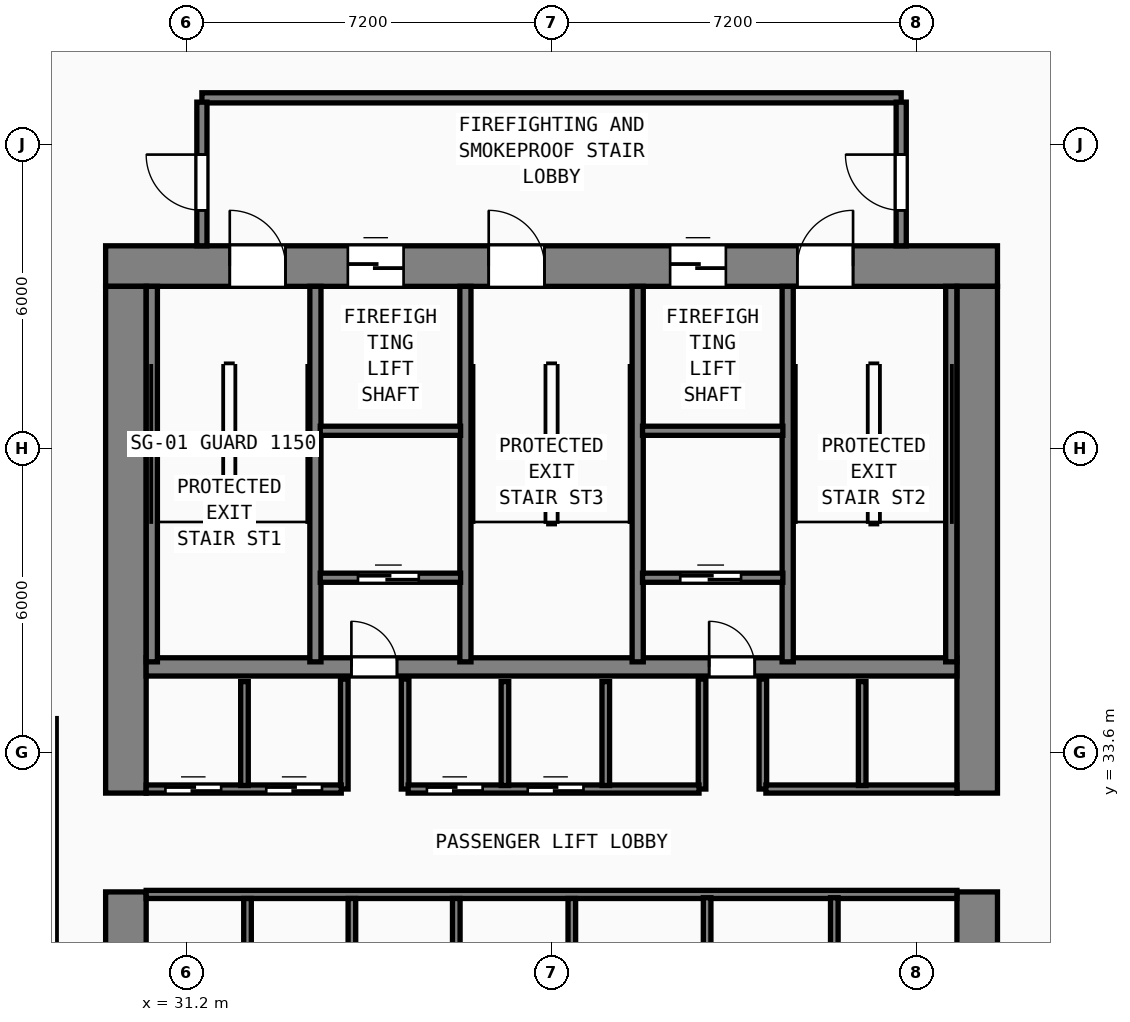
"""IFC4 building model, lengths in metres.
Left out: names, types, materials, properties, quantities, classifications, styles, units other than length and angle.
Written with IfcOpenShell. Run it as: python <this file> out.ifc"""

import sys

from ifc_helpers import new_model, si_unit, direction, frame, frame_2d, origin, place, context, subcontext, project, spatial, rectangle, extrude, element, fill, save


model = new_model("IFC4")
c1 = context("Model", 3, precision=1e-05, world=origin(), true_north=direction((0.0, 1.0)))
c2 = subcontext(c1, "Body", "Model", "MODEL_VIEW")
j1 = project(units=[si_unit("LENGTHUNIT", "METRE"), si_unit("PLANEANGLEUNIT", "RADIAN")], contexts=[c1])
p1 = place(None, origin())
s1 = spatial("IfcSite", under=j1, at=p1, CompositionType="ELEMENT")
p2 = place(p1, origin())
s2 = spatial("IfcBuilding", under=s1, at=p2, CompositionType="ELEMENT")
p3 = place(p2, frame((0.0, 0.0, 15.6)))
s3 = spatial("IfcBuildingStorey", under=s2, at=p3, CompositionType="ELEMENT", Elevation=15.6)
p4 = place(p3, frame((29.6, 43.2, 0.0), z_axis=(0.0, 0.0, 1.0), x_axis=(1.0, 0.0, 0.0)))
e1 = element("IfcWall", 1, at=p4, inside=s3, PredefinedType="SHEAR", context=c2, shape_type="SweptSolid", body=[
    extrude(rectangle(XDim=17.6, YDim=0.8, at=frame_2d((8.8, 0.0))), origin(), (0.0, 0.0, 1.0), 3.78),
])
p5 = place(p4, frame((2.45, 0.0, 0.0)))
e2 = element("IfcOpeningElement", 2, at=p5, cuts=e1, PredefinedType="OPENING", context=c2, shape_type="SweptSolid", body=[
    extrude(rectangle(XDim=1.1, YDim=2.15, at=frame_2d((0.55, 1.075))), frame((0.0, 0.41, 0.0), z_axis=(0.0, -1.0, 0.0), x_axis=(1.0, 0.0, 0.0)), (0.0, 0.0, 1.0), 0.82),
])
p6 = place(p4, frame((7.56, 0.0, 0.0)))
e3 = element("IfcOpeningElement", 3, at=p6, cuts=e1, PredefinedType="OPENING", context=c2, shape_type="SweptSolid", body=[
    extrude(rectangle(XDim=1.1, YDim=2.15, at=frame_2d((0.55, 1.075))), frame((0.0, 0.41, 0.0), z_axis=(0.0, -1.0, 0.0), x_axis=(1.0, 0.0, 0.0)), (0.0, 0.0, 1.0), 0.82),
])
p7 = place(p4, frame((13.65, 0.0, 0.0)))
e4 = element("IfcOpeningElement", 4, at=p7, cuts=e1, PredefinedType="OPENING", context=c2, shape_type="SweptSolid", body=[
    extrude(rectangle(XDim=1.1, YDim=2.15, at=frame_2d((0.55, 1.075))), frame((0.0, 0.41, 0.0), z_axis=(0.0, -1.0, 0.0), x_axis=(1.0, 0.0, 0.0)), (0.0, 0.0, 1.0), 0.82),
])
p8 = place(p4, frame((4.78, 0.0, 0.0)))
e5 = element("IfcOpeningElement", 5, at=p8, cuts=e1, PredefinedType="OPENING", context=c2, shape_type="SweptSolid", body=[
    extrude(rectangle(XDim=1.1, YDim=2.2, at=frame_2d((0.55, 1.1))), frame((0.0, 0.41, 0.0), z_axis=(0.0, -1.0, 0.0), x_axis=(1.0, 0.0, 0.0)), (0.0, 0.0, 1.0), 0.82),
])
p9 = place(p4, frame((11.14, 0.0, 0.0)))
e6 = element("IfcOpeningElement", 6, at=p9, cuts=e1, PredefinedType="OPENING", context=c2, shape_type="SweptSolid", body=[
    extrude(rectangle(XDim=1.1, YDim=2.2, at=frame_2d((0.55, 1.1))), frame((0.0, 0.41, 0.0), z_axis=(0.0, -1.0, 0.0), x_axis=(1.0, 0.0, 0.0)), (0.0, 0.0, 1.0), 0.82),
])
p10 = place(p3, frame((30.0, 26.8, 0.0), z_axis=(0.0, 0.0, 1.0), x_axis=(0.0, 1.0, 0.0)))
e7 = element("IfcWall", 7, at=p10, inside=s3, PredefinedType="SHEAR", context=c2, shape_type="SweptSolid", body=[
    extrude(rectangle(XDim=4.05, YDim=0.8, at=frame_2d((2.025, 0.0))), origin(), (0.0, 0.0, 1.0), 3.78),
])
p11 = place(p3, frame((30.0, 32.8, 0.0), z_axis=(0.0, 0.0, 1.0), x_axis=(0.0, 1.0, 0.0)))
e8 = element("IfcWall", 8, at=p11, inside=s3, PredefinedType="SHEAR", context=c2, shape_type="SweptSolid", body=[
    extrude(rectangle(XDim=10.0, YDim=0.8, at=frame_2d((5.0, 0.0))), origin(), (0.0, 0.0, 1.0), 3.78),
])
p12 = place(p3, frame((46.8, 26.8, 0.0), z_axis=(0.0, 0.0, 1.0), x_axis=(0.0, 1.0, 0.0)))
e9 = element("IfcWall", 9, at=p12, inside=s3, PredefinedType="SHEAR", context=c2, shape_type="SweptSolid", body=[
    extrude(rectangle(XDim=4.05, YDim=0.8, at=frame_2d((2.025, 0.0))), origin(), (0.0, 0.0, 1.0), 3.78),
])
p13 = place(p3, frame((46.8, 32.8, 0.0), z_axis=(0.0, 0.0, 1.0), x_axis=(0.0, 1.0, 0.0)))
e10 = element("IfcWall", 10, at=p13, inside=s3, PredefinedType="SHEAR", context=c2, shape_type="SweptSolid", body=[
    extrude(rectangle(XDim=10.0, YDim=0.8, at=frame_2d((5.0, 0.0))), origin(), (0.0, 0.0, 1.0), 3.78),
])
p14 = place(p3, frame((30.4, 35.29, 0.0), z_axis=(0.0, 0.0, 1.0), x_axis=(1.0, 0.0, 0.0)))
e11 = element("IfcWall", 11, at=p14, inside=s3, PredefinedType="SHEAR", context=c2, shape_type="SweptSolid", body=[
    extrude(rectangle(XDim=16.0, YDim=0.36, at=frame_2d((8.0, 0.0))), origin(), (0.0, 0.0, 1.0), 3.78),
])
p15 = place(p14, frame((4.95, 0.0, 0.0), z_axis=(0.0, 0.0, 1.0), x_axis=(-1.0, 0.0, 0.0)))
e12 = element("IfcOpeningElement", 12, at=p15, cuts=e11, PredefinedType="OPENING", context=c2, shape_type="SweptSolid", body=[
    extrude(rectangle(XDim=0.9, YDim=2.1, at=frame_2d((0.45, 1.05))), frame((0.0, 0.19, 0.0), z_axis=(0.0, -1.0, 0.0), x_axis=(1.0, 0.0, 0.0)), (0.0, 0.0, 1.0), 0.38),
])
p16 = place(p14, frame((12.01, 0.0, 0.0), z_axis=(0.0, 0.0, 1.0), x_axis=(-1.0, 0.0, 0.0)))
e13 = element("IfcOpeningElement", 13, at=p16, cuts=e11, PredefinedType="OPENING", context=c2, shape_type="SweptSolid", body=[
    extrude(rectangle(XDim=0.9, YDim=2.1, at=frame_2d((0.45, 1.05))), frame((0.0, 0.19, 0.0), z_axis=(0.0, -1.0, 0.0), x_axis=(1.0, 0.0, 0.0)), (0.0, 0.0, 1.0), 0.38),
])
for number, where, z_axis, x_axis in (
    (14, (30.512, 35.39, 0.0), (0.0, 0.0, 1.0), (0.0, 1.0, 0.0)),
    (15, (33.74, 35.39, 0.0), (0.0, 0.0, 1.0), (0.0, 1.0, 0.0)),
    (16, (36.7, 35.39, 0.0), (0.0, 0.0, 1.0), (0.0, 1.0, 0.0)),
    (17, (40.1, 35.39, 0.0), (0.0, 0.0, 1.0), (0.0, 1.0, 0.0)),
    (18, (43.06, 35.39, 0.0), (0.0, 0.0, 1.0), (0.0, 1.0, 0.0)),
    (19, (46.288, 35.39, 0.0), (0.0, 0.0, 1.0), (0.0, 1.0, 0.0)),
):
    element("IfcWall", number, at=place(p3, frame(where, z_axis=z_axis, x_axis=x_axis)), inside=s3, PredefinedType="SHEAR", context=c2, shape_type="SweptSolid", body=[
        extrude(rectangle(XDim=7.41, YDim=0.22, at=frame_2d((3.705, 0.0))), origin(), (0.0, 0.0, 1.0), 3.78),
    ])
p17 = place(p3, frame((31.5, 46.52, 0.0), z_axis=(0.0, 0.0, 1.0), x_axis=(1.0, 0.0, 0.0)))
e20 = element("IfcWall", 20, at=p17, inside=s3, PredefinedType="SOLIDWALL", context=c2, shape_type="SweptSolid", body=[
    extrude(rectangle(XDim=13.8, YDim=0.2, at=frame_2d((6.9, 0.0))), origin(), (0.0, 0.0, 1.0), 3.78),
])
p18 = place(p3, frame((31.5, 43.6, 0.0), z_axis=(0.0, 0.0, 1.0), x_axis=(0.0, 1.0, 0.0)))
e21 = element("IfcWall", 21, at=p18, inside=s3, PredefinedType="SOLIDWALL", context=c2, shape_type="SweptSolid", body=[
    extrude(rectangle(XDim=2.835, YDim=0.2, at=frame_2d((1.417, 0.0))), origin(), (0.0, 0.0, 1.0), 3.78),
])
p19 = place(p18, frame((1.8, 0.0, 0.0), z_axis=(0.0, 0.0, 1.0), x_axis=(-1.0, 0.0, 0.0)))
e22 = element("IfcOpeningElement", 22, at=p19, cuts=e21, PredefinedType="OPENING", context=c2, shape_type="SweptSolid", body=[
    extrude(rectangle(XDim=1.1, YDim=2.15, at=frame_2d((0.55, 1.075))), frame((0.0, 0.11, 0.0), z_axis=(0.0, -1.0, 0.0), x_axis=(1.0, 0.0, 0.0)), (0.0, 0.0, 1.0), 0.22),
])
p20 = place(p3, frame((45.3, 43.6, 0.0), z_axis=(0.0, 0.0, 1.0), x_axis=(0.0, 1.0, 0.0)))
e23 = element("IfcWall", 23, at=p20, inside=s3, PredefinedType="SOLIDWALL", context=c2, shape_type="SweptSolid", body=[
    extrude(rectangle(XDim=2.835, YDim=0.2, at=frame_2d((1.417, 0.0))), origin(), (0.0, 0.0, 1.0), 3.78),
])
p21 = place(p20, frame((0.7, 0.0, 0.0)))
e24 = element("IfcOpeningElement", 24, at=p21, cuts=e23, PredefinedType="OPENING", context=c2, shape_type="SweptSolid", body=[
    extrude(rectangle(XDim=1.1, YDim=2.15, at=frame_2d((0.55, 1.075))), frame((0.0, 0.11, 0.0), z_axis=(0.0, -1.0, 0.0), x_axis=(1.0, 0.0, 0.0)), (0.0, 0.0, 1.0), 0.22),
])
for number, where, z_axis, x_axis in (
    (25, (33.835, 39.95, 0.0), (0.0, 0.0, 1.0), (1.0, 0.0, 0.0)),
    (26, (40.195, 39.95, 0.0), (0.0, 0.0, 1.0), (1.0, 0.0, 0.0)),
):
    element("IfcWall", number, at=place(p3, frame(where, z_axis=z_axis, x_axis=x_axis)), inside=s3, PredefinedType="SOLIDWALL", context=c2, shape_type="SweptSolid", body=[
        extrude(rectangle(XDim=2.77, YDim=0.18, at=frame_2d((1.385, 0.0))), origin(), (0.0, 0.0, 1.0), 3.78),
    ])
p22 = place(p3, frame((33.835, 37.05, 0.0), z_axis=(0.0, 0.0, 1.0), x_axis=(1.0, 0.0, 0.0)))
e27 = element("IfcWall", 27, at=p22, inside=s3, PredefinedType="SOLIDWALL", context=c2, shape_type="SweptSolid", body=[
    extrude(rectangle(XDim=2.77, YDim=0.18, at=frame_2d((1.385, 0.0))), origin(), (0.0, 0.0, 1.0), 3.78),
])
p23 = place(p22, frame((1.945, 0.0, 0.0), z_axis=(0.0, 0.0, 1.0), x_axis=(-1.0, 0.0, 0.0)))
e28 = element("IfcOpeningElement", 28, at=p23, cuts=e27, PredefinedType="OPENING", context=c2, shape_type="SweptSolid", body=[
    extrude(rectangle(XDim=1.2, YDim=2.2, at=frame_2d((0.6, 1.1))), frame((0.0, 0.1, 0.0), z_axis=(0.0, -1.0, 0.0), x_axis=(1.0, 0.0, 0.0)), (0.0, 0.0, 1.0), 0.2),
])
for number, where, z_axis, x_axis in (
    (29, (34.31, 32.88, 0.0), (0.0, 0.0, 1.0), (0.0, 1.0, 0.0)),
    (30, (35.51, 32.88, 0.0), (0.0, 0.0, 1.0), (0.0, 1.0, 0.0)),
):
    element("IfcWall", number, at=place(p3, frame(where, z_axis=z_axis, x_axis=x_axis)), inside=s3, PredefinedType="SOLIDWALL", context=c2, shape_type="SweptSolid", body=[
        extrude(rectangle(XDim=2.17, YDim=0.15, at=frame_2d((1.085, 0.0))), origin(), (0.0, 0.0, 1.0), 3.78),
    ])
p24 = place(p3, frame((40.195, 37.05, 0.0), z_axis=(0.0, 0.0, 1.0), x_axis=(1.0, 0.0, 0.0)))
e31 = element("IfcWall", 31, at=p24, inside=s3, PredefinedType="SOLIDWALL", context=c2, shape_type="SweptSolid", body=[
    extrude(rectangle(XDim=2.77, YDim=0.18, at=frame_2d((1.385, 0.0))), origin(), (0.0, 0.0, 1.0), 3.78),
])
p25 = place(p24, frame((1.945, 0.0, 0.0), z_axis=(0.0, 0.0, 1.0), x_axis=(-1.0, 0.0, 0.0)))
e32 = element("IfcOpeningElement", 32, at=p25, cuts=e31, PredefinedType="OPENING", context=c2, shape_type="SweptSolid", body=[
    extrude(rectangle(XDim=1.2, YDim=2.2, at=frame_2d((0.6, 1.1))), frame((0.0, 0.1, 0.0), z_axis=(0.0, -1.0, 0.0), x_axis=(1.0, 0.0, 0.0)), (0.0, 0.0, 1.0), 0.2),
])
for number, where, z_axis, x_axis in (
    (33, (41.37, 32.88, 0.0), (0.0, 0.0, 1.0), (0.0, 1.0, 0.0)),
    (34, (42.57, 32.88, 0.0), (0.0, 0.0, 1.0), (0.0, 1.0, 0.0)),
):
    element("IfcWall", number, at=place(p3, frame(where, z_axis=z_axis, x_axis=x_axis)), inside=s3, PredefinedType="SOLIDWALL", context=c2, shape_type="SweptSolid", body=[
        extrude(rectangle(XDim=2.17, YDim=0.15, at=frame_2d((1.085, 0.0))), origin(), (0.0, 0.0, 1.0), 3.78),
    ])
p26 = place(p3, frame((30.4, 32.88, 0.0), z_axis=(0.0, 0.0, 1.0), x_axis=(1.0, 0.0, 0.0)))
e35 = element("IfcWall", 35, at=p26, inside=s3, PredefinedType="SOLIDWALL", context=c2, shape_type="SweptSolid", body=[
    extrude(rectangle(XDim=3.85, YDim=0.16, at=frame_2d((1.925, 0.0))), origin(), (0.0, 0.0, 1.0), 3.78),
])
p27 = place(p26, frame((1.48, 0.0, 0.0), z_axis=(0.0, 0.0, 1.0), x_axis=(-1.0, 0.0, 0.0)))
e36 = element("IfcOpeningElement", 36, at=p27, cuts=e35, PredefinedType="OPENING", context=c2, shape_type="SweptSolid", body=[
    extrude(rectangle(XDim=1.1, YDim=2.2, at=frame_2d((0.55, 1.1))), frame((0.0, 0.09, 0.0), z_axis=(0.0, -1.0, 0.0), x_axis=(1.0, 0.0, 0.0)), (0.0, 0.0, 1.0), 0.18),
])
p28 = place(p26, frame((3.47, 0.0, 0.0), z_axis=(0.0, 0.0, 1.0), x_axis=(-1.0, 0.0, 0.0)))
e37 = element("IfcOpeningElement", 37, at=p28, cuts=e35, PredefinedType="OPENING", context=c2, shape_type="SweptSolid", body=[
    extrude(rectangle(XDim=1.1, YDim=2.2, at=frame_2d((0.55, 1.1))), frame((0.0, 0.09, 0.0), z_axis=(0.0, -1.0, 0.0), x_axis=(1.0, 0.0, 0.0)), (0.0, 0.0, 1.0), 0.18),
])
p29 = place(p3, frame((35.57, 32.88, 0.0), z_axis=(0.0, 0.0, 1.0), x_axis=(1.0, 0.0, 0.0)))
e38 = element("IfcWall", 38, at=p29, inside=s3, PredefinedType="SOLIDWALL", context=c2, shape_type="SweptSolid", body=[
    extrude(rectangle(XDim=5.74, YDim=0.16, at=frame_2d((2.87, 0.0))), origin(), (0.0, 0.0, 1.0), 3.78),
])
p30 = place(p29, frame((1.47, 0.0, 0.0), z_axis=(0.0, 0.0, 1.0), x_axis=(-1.0, 0.0, 0.0)))
e39 = element("IfcOpeningElement", 39, at=p30, cuts=e38, PredefinedType="OPENING", context=c2, shape_type="SweptSolid", body=[
    extrude(rectangle(XDim=1.1, YDim=2.2, at=frame_2d((0.55, 1.1))), frame((0.0, 0.09, 0.0), z_axis=(0.0, -1.0, 0.0), x_axis=(1.0, 0.0, 0.0)), (0.0, 0.0, 1.0), 0.18),
])
p31 = place(p29, frame((3.46, 0.0, 0.0), z_axis=(0.0, 0.0, 1.0), x_axis=(-1.0, 0.0, 0.0)))
e40 = element("IfcOpeningElement", 40, at=p31, cuts=e38, PredefinedType="OPENING", context=c2, shape_type="SweptSolid", body=[
    extrude(rectangle(XDim=1.1, YDim=2.2, at=frame_2d((0.55, 1.1))), frame((0.0, 0.09, 0.0), z_axis=(0.0, -1.0, 0.0), x_axis=(1.0, 0.0, 0.0)), (0.0, 0.0, 1.0), 0.18),
])
p32 = place(p3, frame((42.63, 32.88, 0.0), z_axis=(0.0, 0.0, 1.0), x_axis=(1.0, 0.0, 0.0)))
e41 = element("IfcWall", 41, at=p32, inside=s3, PredefinedType="SOLIDWALL", context=c2, shape_type="SweptSolid", body=[
    extrude(rectangle(XDim=3.77, YDim=0.16, at=frame_2d((1.885, 0.0))), origin(), (0.0, 0.0, 1.0), 3.78),
])
for number, where, z_axis, x_axis in (
    (42, (32.34, 32.95, 0.0), (0.0, 0.0, 1.0), (0.0, 1.0, 0.0)),
    (43, (37.48, 32.95, 0.0), (0.0, 0.0, 1.0), (0.0, 1.0, 0.0)),
    (44, (39.47, 32.95, 0.0), (0.0, 0.0, 1.0), (0.0, 1.0, 0.0)),
    (45, (44.53, 32.95, 0.0), (0.0, 0.0, 1.0), (0.0, 1.0, 0.0)),
):
    element("IfcWall", number, at=place(p3, frame(where, z_axis=z_axis, x_axis=x_axis)), inside=s3, PredefinedType="SOLIDWALL", context=c2, shape_type="SweptSolid", body=[
        extrude(rectangle(XDim=2.05, YDim=0.15, at=frame_2d((1.025, 0.0))), origin(), (0.0, 0.0, 1.0), 3.78),
    ])
p33 = place(p3, frame((30.4, 30.8, 0.0), z_axis=(0.0, 0.0, 1.0), x_axis=(1.0, 0.0, 0.0)))
e46 = element("IfcWall", 46, at=p33, inside=s3, PredefinedType="SOLIDWALL", context=c2, shape_type="SweptSolid", body=[
    extrude(rectangle(XDim=16.0, YDim=0.16, at=frame_2d((8.0, 0.0))), origin(), (0.0, 0.0, 1.0), 3.78),
])
for number, where, z_axis, x_axis in (
    (47, (32.4, 28.735, 0.0), (0.0, 0.0, 1.0), (0.0, 1.0, 0.0)),
    (48, (34.46, 28.735, 0.0), (0.0, 0.0, 1.0), (0.0, 1.0, 0.0)),
    (49, (36.52, 28.735, 0.0), (0.0, 0.0, 1.0), (0.0, 1.0, 0.0)),
    (50, (38.8, 28.735, 0.0), (0.0, 0.0, 1.0), (0.0, 1.0, 0.0)),
):
    element("IfcWall", number, at=place(p3, frame(where, z_axis=z_axis, x_axis=x_axis)), inside=s3, PredefinedType="SOLIDWALL", context=c2, shape_type="SweptSolid", body=[
        extrude(rectangle(XDim=1.985, YDim=0.15, at=frame_2d((0.992, 0.0))), origin(), (0.0, 0.0, 1.0), 3.78),
    ])
for number, where, z_axis, x_axis in (
    (51, (41.47, 28.75, 0.0), (0.0, 0.0, 1.0), (0.0, 1.0, 0.0)),
    (52, (43.98, 28.75, 0.0), (0.0, 0.0, 1.0), (0.0, 1.0, 0.0)),
):
    element("IfcWall", number, at=place(p3, frame(where, z_axis=z_axis, x_axis=x_axis)), inside=s3, PredefinedType="SOLIDWALL", context=c2, shape_type="SweptSolid", body=[
        extrude(rectangle(XDim=1.985, YDim=0.15, at=frame_2d((0.993, 0.0))), origin(), (0.0, 0.0, 1.0), 3.78),
    ])
p34 = place(p5, origin())
e53 = element("IfcDoor", 53, at=p34, inside=s3, OperationType="SINGLE_SWING_LEFT", PredefinedType="DOOR", context=c2, shape_type="SweptSolid", body=[
    extrude(rectangle(XDim=1.1, YDim=2.15, at=frame_2d((0.55, 1.075))), frame((0.0, 0.185, 0.0), z_axis=(0.0, -1.0, 0.0), x_axis=(1.0, 0.0, 0.0)), (0.0, 0.0, 1.0), 0.05),
])
fill(e2, e53)
p35 = place(p6, origin())
e54 = element("IfcDoor", 54, at=p35, inside=s3, OperationType="SINGLE_SWING_LEFT", PredefinedType="DOOR", context=c2, shape_type="SweptSolid", body=[
    extrude(rectangle(XDim=1.1, YDim=2.15, at=frame_2d((0.55, 1.075))), frame((0.0, 0.185, 0.0), z_axis=(0.0, -1.0, 0.0), x_axis=(1.0, 0.0, 0.0)), (0.0, 0.0, 1.0), 0.05),
])
fill(e3, e54)
p36 = place(p7, origin())
e55 = element("IfcDoor", 55, at=p36, inside=s3, OperationType="SINGLE_SWING_RIGHT", PredefinedType="DOOR", context=c2, shape_type="SweptSolid", body=[
    extrude(rectangle(XDim=1.1, YDim=2.15, at=frame_2d((0.55, 1.075))), frame((0.0, 0.185, 0.0), z_axis=(0.0, -1.0, 0.0), x_axis=(1.0, 0.0, 0.0)), (0.0, 0.0, 1.0), 0.05),
])
fill(e4, e55)
p37 = place(p19, origin())
e56 = element("IfcDoor", 56, at=p37, inside=s3, OperationType="SINGLE_SWING_LEFT", PredefinedType="DOOR", context=c2, shape_type="SweptSolid", body=[
    extrude(rectangle(XDim=1.1, YDim=2.15, at=frame_2d((0.55, 1.075))), frame((0.0, 0.025, 0.0), z_axis=(0.0, -1.0, 0.0), x_axis=(1.0, 0.0, 0.0)), (0.0, 0.0, 1.0), 0.05),
])
fill(e22, e56)
p38 = place(p21, origin())
e57 = element("IfcDoor", 57, at=p38, inside=s3, OperationType="SINGLE_SWING_RIGHT", PredefinedType="DOOR", context=c2, shape_type="SweptSolid", body=[
    extrude(rectangle(XDim=1.1, YDim=2.15, at=frame_2d((0.55, 1.075))), frame((0.0, 0.025, 0.0), z_axis=(0.0, -1.0, 0.0), x_axis=(1.0, 0.0, 0.0)), (0.0, 0.0, 1.0), 0.05),
])
fill(e24, e57)
p39 = place(p8, origin())
e58 = element("IfcDoor", 58, at=p39, inside=s3, OperationType="SLIDING_TO_LEFT", PredefinedType="DOOR", context=c2, shape_type="SweptSolid", body=[
    extrude(rectangle(XDim=1.1, YDim=2.2, at=frame_2d((0.55, 1.1))), frame((0.0, 0.185, 0.0), z_axis=(0.0, -1.0, 0.0), x_axis=(1.0, 0.0, 0.0)), (0.0, 0.0, 1.0), 0.05),
])
fill(e5, e58)
p40 = place(p9, origin())
e59 = element("IfcDoor", 59, at=p40, inside=s3, OperationType="SLIDING_TO_LEFT", PredefinedType="DOOR", context=c2, shape_type="SweptSolid", body=[
    extrude(rectangle(XDim=1.1, YDim=2.2, at=frame_2d((0.55, 1.1))), frame((0.0, 0.185, 0.0), z_axis=(0.0, -1.0, 0.0), x_axis=(1.0, 0.0, 0.0)), (0.0, 0.0, 1.0), 0.05),
])
fill(e6, e59)
p41 = place(p23, origin())
e60 = element("IfcDoor", 60, at=p41, inside=s3, OperationType="SLIDING_TO_RIGHT", PredefinedType="DOOR", context=c2, shape_type="SweptSolid", body=[
    extrude(rectangle(XDim=1.2, YDim=2.2, at=frame_2d((0.6, 1.1))), frame((0.0, 0.025, 0.0), z_axis=(0.0, -1.0, 0.0), x_axis=(1.0, 0.0, 0.0)), (0.0, 0.0, 1.0), 0.05),
])
fill(e28, e60)
p42 = place(p15, origin())
e61 = element("IfcDoor", 61, at=p42, inside=s3, OperationType="SINGLE_SWING_RIGHT", PredefinedType="DOOR", context=c2, shape_type="SweptSolid", body=[
    extrude(rectangle(XDim=0.9, YDim=2.1, at=frame_2d((0.45, 1.05))), frame((0.0, 0.025, 0.0), z_axis=(0.0, -1.0, 0.0), x_axis=(1.0, 0.0, 0.0)), (0.0, 0.0, 1.0), 0.05),
])
fill(e12, e61)
p43 = place(p25, origin())
e62 = element("IfcDoor", 62, at=p43, inside=s3, OperationType="SLIDING_TO_RIGHT", PredefinedType="DOOR", context=c2, shape_type="SweptSolid", body=[
    extrude(rectangle(XDim=1.2, YDim=2.2, at=frame_2d((0.6, 1.1))), frame((0.0, 0.025, 0.0), z_axis=(0.0, -1.0, 0.0), x_axis=(1.0, 0.0, 0.0)), (0.0, 0.0, 1.0), 0.05),
])
fill(e32, e62)
p44 = place(p16, origin())
e63 = element("IfcDoor", 63, at=p44, inside=s3, OperationType="SINGLE_SWING_RIGHT", PredefinedType="DOOR", context=c2, shape_type="SweptSolid", body=[
    extrude(rectangle(XDim=0.9, YDim=2.1, at=frame_2d((0.45, 1.05))), frame((0.0, 0.025, 0.0), z_axis=(0.0, -1.0, 0.0), x_axis=(1.0, 0.0, 0.0)), (0.0, 0.0, 1.0), 0.05),
])
fill(e13, e63)
p45 = place(p27, origin())
e64 = element("IfcDoor", 64, at=p45, inside=s3, OperationType="SLIDING_TO_LEFT", PredefinedType="DOOR", context=c2, shape_type="SweptSolid", body=[
    extrude(rectangle(XDim=1.1, YDim=2.2, at=frame_2d((0.55, 1.1))), frame((0.0, 0.025, 0.0), z_axis=(0.0, -1.0, 0.0), x_axis=(1.0, 0.0, 0.0)), (0.0, 0.0, 1.0), 0.05),
])
fill(e36, e64)
p46 = place(p28, origin())
e65 = element("IfcDoor", 65, at=p46, inside=s3, OperationType="SLIDING_TO_LEFT", PredefinedType="DOOR", context=c2, shape_type="SweptSolid", body=[
    extrude(rectangle(XDim=1.1, YDim=2.2, at=frame_2d((0.55, 1.1))), frame((0.0, 0.025, 0.0), z_axis=(0.0, -1.0, 0.0), x_axis=(1.0, 0.0, 0.0)), (0.0, 0.0, 1.0), 0.05),
])
fill(e37, e65)
p47 = place(p30, origin())
e66 = element("IfcDoor", 66, at=p47, inside=s3, OperationType="SLIDING_TO_LEFT", PredefinedType="DOOR", context=c2, shape_type="SweptSolid", body=[
    extrude(rectangle(XDim=1.1, YDim=2.2, at=frame_2d((0.55, 1.1))), frame((0.0, 0.025, 0.0), z_axis=(0.0, -1.0, 0.0), x_axis=(1.0, 0.0, 0.0)), (0.0, 0.0, 1.0), 0.05),
])
fill(e39, e66)
p48 = place(p31, origin())
e67 = element("IfcDoor", 67, at=p48, inside=s3, OperationType="SLIDING_TO_LEFT", PredefinedType="DOOR", context=c2, shape_type="SweptSolid", body=[
    extrude(rectangle(XDim=1.1, YDim=2.2, at=frame_2d((0.55, 1.1))), frame((0.0, 0.025, 0.0), z_axis=(0.0, -1.0, 0.0), x_axis=(1.0, 0.0, 0.0)), (0.0, 0.0, 1.0), 0.05),
])
fill(e40, e67)
save(model, sys.argv[1])
